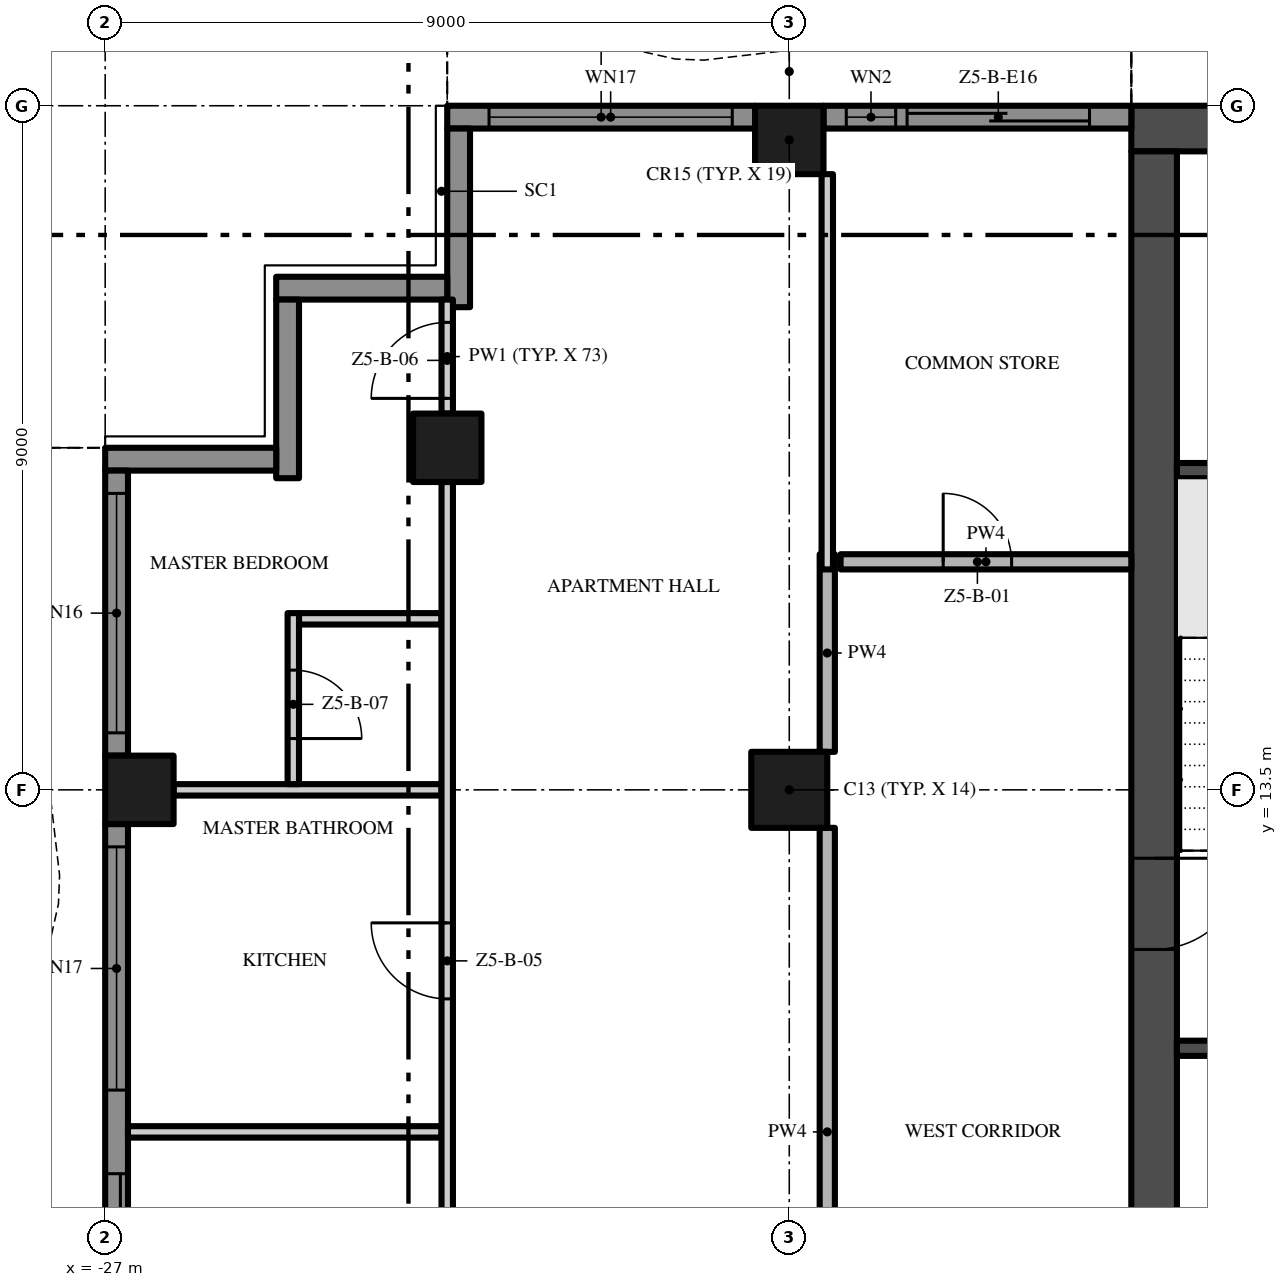
"""IFC4 building model, lengths in metres.
Left out: names, types, materials, properties, quantities, classifications, styles, units other than length and angle.
Written with IfcOpenShell. Run it as: python <this file> out.ifc"""

import sys

from ifc_helpers import new_model, si_unit, direction, frame, frame_2d, origin, origin_2d, place, context, subcontext, project, spatial, polyline, rectangle, outline, extrude, element, fill, save


model = new_model("IFC4")
c1 = context("Model", 3, precision=1e-05, world=origin(), true_north=direction((0.0, 1.0)))
c2 = subcontext(c1, "Body", "Model", "MODEL_VIEW")
j1 = project(units=[si_unit("LENGTHUNIT", "METRE"), si_unit("PLANEANGLEUNIT", "RADIAN")], contexts=[c1])
p1 = place(None, origin())
s1 = spatial("IfcSite", under=j1, at=p1, CompositionType="ELEMENT")
p2 = place(p1, origin())
s2 = spatial("IfcBuilding", under=s1, at=p2, CompositionType="ELEMENT")
p3 = place(p2, frame((0.0, 0.0, 254.0)))
s3 = spatial("IfcBuildingStorey", under=s2, at=p3, CompositionType="ELEMENT", Elevation=254.0)
p4 = place(p3, frame((13.5, 22.2, -0.3), z_axis=(0.0, 0.0, 1.0), x_axis=(-1.0, 0.0, 0.0)))
e1 = element("IfcWall", 1, at=p4, inside=s3, PredefinedType="SHEAR", context=c2, shape_type="SweptSolid", body=[
    extrude(rectangle(XDim=27.0, YDim=0.6, at=frame_2d((13.5, 0.0))), origin(), (0.0, 0.0, 1.0), 3.8),
])
p5 = place(p3, frame((-13.2, 21.9, -0.3), z_axis=(0.0, 0.0, 1.0), x_axis=(0.0, -1.0, 0.0)))
e2 = element("IfcWall", 2, at=p5, inside=s3, PredefinedType="SHEAR", context=c2, shape_type="SweptSolid", body=[
    extrude(rectangle(XDim=16.8, YDim=0.6, at=frame_2d((8.4, 0.0))), origin(), (0.0, 0.0, 1.0), 3.8),
])
p6 = place(p5, frame((9.3, 0.0, 0.3)))
e3 = element("IfcOpeningElement", 3, at=p6, cuts=e2, PredefinedType="OPENING", context=c2, shape_type="SweptSolid", body=[
    extrude(rectangle(XDim=1.2, YDim=2.2, at=frame_2d((0.6, 1.1))), frame((0.0, 0.31, 0.0), z_axis=(0.0, -1.0, 0.0), x_axis=(1.0, 0.0, 0.0)), (0.0, 0.0, 1.0), 0.62),
])
p7 = place(p3, frame((-18.0, 13.5, 0.0), z_axis=(0.0, 0.0, 1.0), x_axis=(1.0, 0.0, 0.0)))
e4 = element("IfcColumn", 4, at=p7, inside=s3, PredefinedType="COLUMN", context=c2, shape_type="SweptSolid", body=[
    extrude(rectangle(XDim=1.0, YDim=1.0, at=origin_2d()), origin(), (0.0, 0.0, 1.0), 3.5),
])
for number, where, z_axis, x_axis in (
    (5, (-18.0, 22.05, 0.0), (0.0, 0.0, 1.0), (1.0, 0.0, 0.0)),
    (6, (-26.55, 13.5, 0.0), (0.0, 0.0, 1.0), (1.0, 0.0, 0.0)),
    (7, (-22.5, 18.0, 0.0), (0.0, 0.0, 1.0), (1.0, 0.0, 0.0)),
):
    element("IfcColumn", number, at=place(p3, frame(where, z_axis=z_axis, x_axis=x_axis)), inside=s3, PredefinedType="COLUMN", context=c2, shape_type="SweptSolid", body=[
        extrude(rectangle(XDim=0.9, YDim=0.9, at=origin_2d()), origin(), (0.0, 0.0, 1.0), 3.5),
    ])
p8 = place(p3, frame((-17.55, 22.35, 0.0), z_axis=(0.0, 0.0, 1.0), x_axis=(1.0, 0.0, 0.0)))
e8 = element("IfcWall", 8, at=p8, inside=s3, PredefinedType="SOLIDWALL", context=c2, shape_type="SweptSolid", body=[
    extrude(rectangle(XDim=4.05, YDim=0.3, at=frame_2d((2.025, 0.0))), origin(), (0.0, 0.0, 1.0), 3.5),
])
p9 = place(p8, frame((1.1, 0.0, 0.0)))
e9 = element("IfcOpeningElement", 9, at=p9, cuts=e8, PredefinedType="OPENING", context=c2, shape_type="SweptSolid", body=[
    extrude(rectangle(XDim=2.4, YDim=2.4, at=frame_2d((1.2, 1.2))), frame((0.0, 0.16, 0.0), z_axis=(0.0, -1.0, 0.0), x_axis=(1.0, 0.0, 0.0)), (0.0, 0.0, 1.0), 0.32),
])
p10 = place(p8, frame((0.3, 0.0, 0.45)))
e10 = element("IfcOpeningElement", 10, at=p10, cuts=e8, PredefinedType="OPENING", context=c2, shape_type="SweptSolid", body=[
    extrude(rectangle(XDim=0.65, YDim=2.65, at=frame_2d((0.325, 1.325))), frame((0.0, 0.16, 0.0), z_axis=(0.0, -1.0, 0.0), x_axis=(1.0, 0.0, 0.0)), (0.0, 0.0, 1.0), 0.32),
])
p11 = place(p3, frame((-22.5, 22.35, 0.0), z_axis=(0.0, 0.0, 1.0), x_axis=(1.0, 0.0, 0.0)))
e11 = element("IfcWall", 11, at=p11, inside=s3, PredefinedType="SOLIDWALL", context=c2, shape_type="SweptSolid", body=[
    extrude(rectangle(XDim=4.05, YDim=0.3, at=frame_2d((2.025, 0.0))), origin(), (0.0, 0.0, 1.0), 3.5),
])
p12 = place(p11, frame((0.55, 0.0, 0.45)))
e12 = element("IfcOpeningElement", 12, at=p12, cuts=e11, PredefinedType="OPENING", context=c2, shape_type="SweptSolid", body=[
    extrude(rectangle(XDim=3.2, YDim=2.65, at=frame_2d((1.6, 1.325))), frame((0.0, 0.16, 0.0), z_axis=(0.0, -1.0, 0.0), x_axis=(1.0, 0.0, 0.0)), (0.0, 0.0, 1.0), 0.32),
])
p13 = place(p3, frame((-22.35, 19.85, 0.0), z_axis=(0.0, 0.0, 1.0), x_axis=(0.0, 1.0, 0.0)))
e13 = element("IfcWall", 13, at=p13, inside=s3, PredefinedType="SOLIDWALL", context=c2, shape_type="SweptSolid", body=[
    extrude(rectangle(XDim=2.35, YDim=0.3, at=frame_2d((1.175, 0.0))), origin(), (0.0, 0.0, 1.0), 3.5),
])
p14 = place(p3, frame((-24.75, 20.1, 0.0), z_axis=(0.0, 0.0, 1.0), x_axis=(1.0, 0.0, 0.0)))
e14 = element("IfcWall", 14, at=p14, inside=s3, PredefinedType="SOLIDWALL", context=c2, shape_type="SweptSolid", body=[
    extrude(rectangle(XDim=2.25, YDim=0.3, at=frame_2d((1.125, 0.0))), origin(), (0.0, 0.0, 1.0), 3.5),
])
p15 = place(p3, frame((-24.6, 17.6, 0.0), z_axis=(0.0, 0.0, 1.0), x_axis=(0.0, 1.0, 0.0)))
e15 = element("IfcWall", 15, at=p15, inside=s3, PredefinedType="SOLIDWALL", context=c2, shape_type="SweptSolid", body=[
    extrude(rectangle(XDim=2.35, YDim=0.3, at=frame_2d((1.175, 0.0))), origin(), (0.0, 0.0, 1.0), 3.5),
])
p16 = place(p3, frame((-27.0, 17.85, 0.0), z_axis=(0.0, 0.0, 1.0), x_axis=(1.0, 0.0, 0.0)))
e16 = element("IfcWall", 16, at=p16, inside=s3, PredefinedType="SOLIDWALL", context=c2, shape_type="SweptSolid", body=[
    extrude(rectangle(XDim=2.25, YDim=0.3, at=frame_2d((1.125, 0.0))), origin(), (0.0, 0.0, 1.0), 3.5),
])
p17 = place(p3, frame((-26.85, 13.95, 0.0), z_axis=(0.0, 0.0, 1.0), x_axis=(0.0, 1.0, 0.0)))
e17 = element("IfcWall", 17, at=p17, inside=s3, PredefinedType="SOLIDWALL", context=c2, shape_type="SweptSolid", body=[
    extrude(rectangle(XDim=3.75, YDim=0.3, at=frame_2d((1.875, 0.0))), origin(), (0.0, 0.0, 1.0), 3.5),
])
p18 = place(p17, frame((0.3, 0.0, 0.45)))
e18 = element("IfcOpeningElement", 18, at=p18, cuts=e17, PredefinedType="OPENING", context=c2, shape_type="SweptSolid", body=[
    extrude(rectangle(XDim=3.15, YDim=2.65, at=frame_2d((1.575, 1.325))), frame((0.0, 0.16, 0.0), z_axis=(0.0, -1.0, 0.0), x_axis=(1.0, 0.0, 0.0)), (0.0, 0.0, 1.0), 0.32),
])
p19 = place(p3, frame((-26.85, 4.95, 0.0), z_axis=(0.0, 0.0, 1.0), x_axis=(0.0, 1.0, 0.0)))
e19 = element("IfcWall", 19, at=p19, inside=s3, PredefinedType="SOLIDWALL", context=c2, shape_type="SweptSolid", body=[
    extrude(rectangle(XDim=8.1, YDim=0.3, at=frame_2d((4.05, 0.0))), origin(), (0.0, 0.0, 1.0), 3.5),
])
p20 = place(p19, frame((4.6, 0.0, 0.45)))
e20 = element("IfcOpeningElement", 20, at=p20, cuts=e19, PredefinedType="OPENING", context=c2, shape_type="SweptSolid", body=[
    extrude(rectangle(XDim=3.2, YDim=2.65, at=frame_2d((1.6, 1.325))), frame((0.0, 0.16, 0.0), z_axis=(0.0, -1.0, 0.0), x_axis=(1.0, 0.0, 0.0)), (0.0, 0.0, 1.0), 0.32),
])
p21 = place(p19, frame((0.3, 0.0, 0.0)))
e21 = element("IfcOpeningElement", 21, at=p21, cuts=e19, PredefinedType="OPENING", context=c2, shape_type="SweptSolid", body=[
    extrude(rectangle(XDim=3.2, YDim=2.4, at=frame_2d((1.6, 1.2))), frame((0.0, 0.16, 0.0), z_axis=(0.0, -1.0, 0.0), x_axis=(1.0, 0.0, 0.0)), (0.0, 0.0, 1.0), 0.32),
])
p22 = place(p3, origin())
e22 = element("IfcWall", 22, at=p22, inside=s3, PredefinedType="USERDEFINED", context=c2, shape_type="SweptSolid", body=[
    extrude(outline(polyline([(-13.5, 25.149), (-15.0, 24.488), (-16.5, 23.755), (-18.0, 23.231), (-19.125, 23.1), (-19.5, 23.115), (-21.0, 23.451), (-22.5, 24.112), (-22.601, 23.883), (-21.079, 23.213), (-19.533, 22.866), (-19.115, 22.849), (-17.944, 22.986), (-16.404, 23.524), (-14.895, 24.261), (-13.399, 24.92), (-13.5, 25.149)])), origin(), (0.0, 0.0, 1.0), 0.9),
])
p23 = place(p3, origin())
e23 = element("IfcWall", 23, at=p23, inside=s3, PredefinedType="USERDEFINED", context=c2, shape_type="SweptSolid", body=[
    extrude(outline(polyline([(-29.649, 18.0), (-28.988, 16.5), (-28.255, 15.0), (-27.731, 13.5), (-27.6, 12.375), (-27.615, 12.0), (-27.951, 10.5), (-28.612, 9.0), (-29.345, 7.5), (-29.869, 6.0), (-30.0, 4.875), (-29.985, 4.5), (-29.649, 3.0), (-28.988, 1.5), (-28.255, 0.0), (-27.731, -1.5), (-27.6, -2.625), (-27.615, -3.0), (-27.951, -4.5), (-28.612, -6.0), (-29.345, -7.5), (-29.869, -9.0), (-30.0, -10.125), (-29.985, -10.5), (-29.649, -12.0), (-28.988, -13.5), (-28.255, -15.0), (-27.731, -16.5), (-27.6, -17.625), (-27.615, -18.0), (-27.365, -18.01), (-27.349, -17.615), (-27.486, -16.444), (-28.024, -14.904), (-28.761, -13.395), (-29.41, -11.921), (-29.736, -10.467), (-29.749, -10.135), (-29.624, -9.056), (-29.114, -7.596), (-28.385, -6.105), (-27.713, -4.579), (-27.366, -3.033), (-27.349, -2.615), (-27.486, -1.444), (-28.024, 0.096), (-28.761, 1.605), (-29.41, 3.079), (-29.736, 4.533), (-29.749, 4.865), (-29.624, 5.944), (-29.114, 7.404), (-28.385, 8.895), (-27.713, 10.421), (-27.366, 11.967), (-27.349, 12.385), (-27.486, 13.556), (-28.024, 15.096), (-28.761, 16.605), (-29.42, 18.101), (-29.649, 18.0)])), origin(), (0.0, 0.0, 1.0), 0.9),
])
for number, where, z_axis, x_axis in (
    (24, (-12.9, 10.1, 0.0), (0.0, 0.0, 1.0), (1.0, 0.0, 0.0)),
    (25, (-12.9, 17.7, 0.0), (0.0, 0.0, 1.0), (1.0, 0.0, 0.0)),
):
    element("IfcWall", number, at=place(p3, frame(where, z_axis=z_axis, x_axis=x_axis)), inside=s3, PredefinedType="SHEAR", context=c2, shape_type="SweptSolid", body=[
        extrude(rectangle(XDim=3.25, YDim=0.2, at=frame_2d((1.625, 0.0))), origin(), (0.0, 0.0, 1.0), 3.5),
    ])
p24 = place(p3, frame((-26.7, 9.0, 0.0), z_axis=(0.0, 0.0, 1.0), x_axis=(1.0, 0.0, 0.0)))
e26 = element("IfcWall", 26, at=p24, inside=s3, PredefinedType="PARTITIONING", context=c2, shape_type="SweptSolid", body=[
    extrude(rectangle(XDim=4.125, YDim=0.15, at=frame_2d((2.062, 0.0))), origin(), (0.0, 0.0, 1.0), 3.5),
])
p25 = place(p3, frame((-26.1, 13.5, 0.0), z_axis=(0.0, 0.0, 1.0), x_axis=(1.0, 0.0, 0.0)))
e27 = element("IfcWall", 27, at=p25, inside=s3, PredefinedType="PARTITIONING", context=c2, shape_type="SweptSolid", body=[
    extrude(rectangle(XDim=3.525, YDim=0.15, at=frame_2d((1.762, 0.0))), origin(), (0.0, 0.0, 1.0), 3.5),
])
p26 = place(p3, frame((-24.45, 15.75, 0.0), z_axis=(0.0, 0.0, 1.0), x_axis=(1.0, 0.0, 0.0)))
e28 = element("IfcWall", 28, at=p26, inside=s3, PredefinedType="PARTITIONING", context=c2, shape_type="SweptSolid", body=[
    extrude(rectangle(XDim=1.875, YDim=0.15, at=frame_2d((0.938, 0.0))), origin(), (0.0, 0.0, 1.0), 3.5),
])
p27 = place(p3, frame((-17.325, 16.5, 0.0), z_axis=(0.0, 0.0, 1.0), x_axis=(1.0, 0.0, 0.0)))
e29 = element("IfcWall", 29, at=p27, inside=s3, PredefinedType="PARTITIONING", context=c2, shape_type="SweptSolid", body=[
    extrude(rectangle(XDim=3.825, YDim=0.2, at=frame_2d((1.913, 0.0))), origin(), (0.0, 0.0, 1.0), 3.5),
])
p28 = place(p27, frame((1.35, 0.0, 0.0)))
e30 = element("IfcOpeningElement", 30, at=p28, cuts=e29, PredefinedType="OPENING", context=c2, shape_type="SweptSolid", body=[
    extrude(rectangle(XDim=0.9, YDim=2.1, at=frame_2d((0.45, 1.05))), frame((0.0, 0.11, 0.0), z_axis=(0.0, -1.0, 0.0), x_axis=(1.0, 0.0, 0.0)), (0.0, 0.0, 1.0), 0.22),
])
p29 = place(p3, frame((-24.525, 15.825, 0.0), z_axis=(0.0, 0.0, 1.0), x_axis=(0.0, -1.0, 0.0)))
e31 = element("IfcWall", 31, at=p29, inside=s3, PredefinedType="PARTITIONING", context=c2, shape_type="SweptSolid", body=[
    extrude(rectangle(XDim=2.25, YDim=0.15, at=frame_2d((1.125, 0.0))), origin(), (0.0, 0.0, 1.0), 3.5),
])
p30 = place(p29, frame((0.75, 0.0, 0.0)))
e32 = element("IfcOpeningElement", 32, at=p30, cuts=e31, PredefinedType="OPENING", context=c2, shape_type="SweptSolid", body=[
    extrude(rectangle(XDim=0.9, YDim=2.1, at=frame_2d((0.45, 1.05))), frame((0.0, 0.085, 0.0), z_axis=(0.0, -1.0, 0.0), x_axis=(1.0, 0.0, 0.0)), (0.0, 0.0, 1.0), 0.17),
])
p31 = place(p3, frame((-22.5, 0.1, 0.0), z_axis=(0.0, 0.0, 1.0), x_axis=(0.0, 1.0, 0.0)))
e33 = element("IfcWall", 33, at=p31, inside=s3, PredefinedType="PARTITIONING", context=c2, shape_type="SweptSolid", body=[
    extrude(rectangle(XDim=17.45, YDim=0.15, at=frame_2d((8.725, 0.0))), origin(), (0.0, 0.0, 1.0), 3.5),
])
p32 = place(p31, frame((2.4, 0.0, 0.0)))
e34 = element("IfcOpeningElement", 34, at=p32, cuts=e33, PredefinedType="OPENING", context=c2, shape_type="SweptSolid", body=[
    extrude(rectangle(XDim=1.8, YDim=2.4, at=frame_2d((0.9, 1.2))), frame((0.0, 0.085, 0.0), z_axis=(0.0, -1.0, 0.0), x_axis=(1.0, 0.0, 0.0)), (0.0, 0.0, 1.0), 0.17),
])
p33 = place(p31, frame((10.65, 0.0, 0.0)))
e35 = element("IfcOpeningElement", 35, at=p33, cuts=e33, PredefinedType="OPENING", context=c2, shape_type="SweptSolid", body=[
    extrude(rectangle(XDim=1.0, YDim=2.4, at=frame_2d((0.5, 1.2))), frame((0.0, 0.085, 0.0), z_axis=(0.0, -1.0, 0.0), x_axis=(1.0, 0.0, 0.0)), (0.0, 0.0, 1.0), 0.17),
])
p34 = place(p3, frame((-22.5, 18.45, 0.0), z_axis=(0.0, 0.0, 1.0), x_axis=(0.0, 1.0, 0.0)))
e36 = element("IfcWall", 36, at=p34, inside=s3, PredefinedType="PARTITIONING", context=c2, shape_type="SweptSolid", body=[
    extrude(rectangle(XDim=1.5, YDim=0.15, at=frame_2d((0.75, 0.0))), origin(), (0.0, 0.0, 1.0), 3.5),
])
p35 = place(p34, frame((0.2, 0.0, 0.0)))
e37 = element("IfcOpeningElement", 37, at=p35, cuts=e36, PredefinedType="OPENING", context=c2, shape_type="SweptSolid", body=[
    extrude(rectangle(XDim=1.0, YDim=2.4, at=frame_2d((0.5, 1.2))), frame((0.0, 0.085, 0.0), z_axis=(0.0, -1.0, 0.0), x_axis=(1.0, 0.0, 0.0)), (0.0, 0.0, 1.0), 0.17),
])
p36 = place(p3, frame((-17.5, 5.0, 0.0), z_axis=(0.0, 0.0, 1.0), x_axis=(0.0, 1.0, 0.0)))
e38 = element("IfcWall", 38, at=p36, inside=s3, PredefinedType="PARTITIONING", context=c2, shape_type="SweptSolid", body=[
    extrude(rectangle(XDim=8.0, YDim=0.2, at=frame_2d((4.0, 0.0))), origin(), (0.0, 0.0, 1.0), 3.5),
])
p37 = place(p36, frame((1.15, 0.0, 0.0)))
e39 = element("IfcOpeningElement", 39, at=p37, cuts=e38, PredefinedType="OPENING", context=c2, shape_type="SweptSolid", body=[
    extrude(rectangle(XDim=1.2, YDim=2.4, at=frame_2d((0.6, 1.2))), frame((0.0, 0.11, 0.0), z_axis=(0.0, -1.0, 0.0), x_axis=(1.0, 0.0, 0.0)), (0.0, 0.0, 1.0), 0.22),
])
p38 = place(p3, frame((-17.5, 14.0, 0.0), z_axis=(0.0, 0.0, 1.0), x_axis=(0.0, 1.0, 0.0)))
e40 = element("IfcWall", 40, at=p38, inside=s3, PredefinedType="PARTITIONING", context=c2, shape_type="SweptSolid", body=[
    extrude(rectangle(XDim=2.6, YDim=0.2, at=frame_2d((1.3, 0.0))), origin(), (0.0, 0.0, 1.0), 3.5),
])
p39 = place(p3, frame((-17.5, 16.4, 0.0), z_axis=(0.0, 0.0, 1.0), x_axis=(0.0, 1.0, 0.0)))
e41 = element("IfcWall", 41, at=p39, inside=s3, PredefinedType="PARTITIONING", context=c2, shape_type="SweptSolid", body=[
    extrude(rectangle(XDim=5.2, YDim=0.15, at=frame_2d((2.6, 0.0))), origin(), (0.0, 0.0, 1.0), 3.5),
])
p40 = place(p9, origin())
e42 = element("IfcDoor", 42, at=p40, inside=s3, OperationType="SINGLE_SWING_LEFT", PredefinedType="DOOR", context=c2, shape_type="SweptSolid", body=[
    extrude(rectangle(XDim=2.4, YDim=2.4, at=frame_2d((1.2, 1.2))), frame((0.0, 0.025, 0.0), z_axis=(0.0, -1.0, 0.0), x_axis=(1.0, 0.0, 0.0)), (0.0, 0.0, 1.0), 0.05),
])
fill(e9, e42)
p41 = place(p10, origin())
e43 = element("IfcWindow", 43, at=p41, inside=s3, PartitioningType="SINGLE_PANEL", PredefinedType="WINDOW", context=c2, shape_type="SweptSolid", body=[
    extrude(rectangle(XDim=0.65, YDim=2.65, at=frame_2d((0.325, 1.325))), frame((0.0, 0.03, 0.0), z_axis=(0.0, -1.0, 0.0), x_axis=(1.0, 0.0, 0.0)), (0.0, 0.0, 1.0), 0.06),
])
fill(e10, e43)
p42 = place(p12, origin())
e44 = element("IfcWindow", 44, at=p42, inside=s3, PartitioningType="SINGLE_PANEL", PredefinedType="WINDOW", context=c2, shape_type="SweptSolid", body=[
    extrude(rectangle(XDim=3.2, YDim=2.65, at=frame_2d((1.6, 1.325))), frame((0.0, 0.03, 0.0), z_axis=(0.0, -1.0, 0.0), x_axis=(1.0, 0.0, 0.0)), (0.0, 0.0, 1.0), 0.06),
])
fill(e12, e44)
p43 = place(p18, origin())
e45 = element("IfcWindow", 45, at=p43, inside=s3, PartitioningType="SINGLE_PANEL", PredefinedType="WINDOW", context=c2, shape_type="SweptSolid", body=[
    extrude(rectangle(XDim=3.15, YDim=2.65, at=frame_2d((1.575, 1.325))), frame((0.0, 0.03, 0.0), z_axis=(0.0, -1.0, 0.0), x_axis=(1.0, 0.0, 0.0)), (0.0, 0.0, 1.0), 0.06),
])
fill(e18, e45)
p44 = place(p20, origin())
e46 = element("IfcWindow", 46, at=p44, inside=s3, PartitioningType="SINGLE_PANEL", PredefinedType="WINDOW", context=c2, shape_type="SweptSolid", body=[
    extrude(rectangle(XDim=3.2, YDim=2.65, at=frame_2d((1.6, 1.325))), frame((0.0, 0.03, 0.0), z_axis=(0.0, -1.0, 0.0), x_axis=(1.0, 0.0, 0.0)), (0.0, 0.0, 1.0), 0.06),
])
fill(e20, e46)
p45 = place(p21, origin())
e47 = element("IfcDoor", 47, at=p45, inside=s3, OperationType="SINGLE_SWING_LEFT", PredefinedType="DOOR", context=c2, shape_type="SweptSolid", body=[
    extrude(rectangle(XDim=3.2, YDim=2.4, at=frame_2d((1.6, 1.2))), frame((0.0, 0.025, 0.0), z_axis=(0.0, -1.0, 0.0), x_axis=(1.0, 0.0, 0.0)), (0.0, 0.0, 1.0), 0.05),
])
fill(e21, e47)
p46 = place(p6, frame((1.2, 0.0, 0.0), z_axis=(0.0, 0.0, 1.0), x_axis=(-1.0, 0.0, 0.0)))
e48 = element("IfcDoor", 48, at=p46, inside=s3, OperationType="SINGLE_SWING_RIGHT", PredefinedType="DOOR", context=c2, shape_type="SweptSolid", body=[
    extrude(rectangle(XDim=1.2, YDim=2.2, at=frame_2d((0.6, 1.1))), frame((0.0, 0.025, 0.0), z_axis=(0.0, -1.0, 0.0), x_axis=(1.0, 0.0, 0.0)), (0.0, 0.0, 1.0), 0.05),
])
fill(e3, e48)
p47 = place(p28, origin())
e49 = element("IfcDoor", 49, at=p47, inside=s3, OperationType="SINGLE_SWING_LEFT", PredefinedType="DOOR", context=c2, shape_type="SweptSolid", body=[
    extrude(rectangle(XDim=0.9, YDim=2.1, at=frame_2d((0.45, 1.05))), frame((0.0, 0.025, 0.0), z_axis=(0.0, -1.0, 0.0), x_axis=(1.0, 0.0, 0.0)), (0.0, 0.0, 1.0), 0.05),
])
fill(e30, e49)
p48 = place(p33, origin())
e50 = element("IfcDoor", 50, at=p48, inside=s3, OperationType="SINGLE_SWING_RIGHT", PredefinedType="DOOR", context=c2, shape_type="SweptSolid", body=[
    extrude(rectangle(XDim=1.0, YDim=2.4, at=frame_2d((0.5, 1.2))), frame((0.0, 0.025, 0.0), z_axis=(0.0, -1.0, 0.0), x_axis=(1.0, 0.0, 0.0)), (0.0, 0.0, 1.0), 0.05),
])
fill(e35, e50)
p49 = place(p35, origin())
e51 = element("IfcDoor", 51, at=p49, inside=s3, OperationType="SINGLE_SWING_LEFT", PredefinedType="DOOR", context=c2, shape_type="SweptSolid", body=[
    extrude(rectangle(XDim=1.0, YDim=2.4, at=frame_2d((0.5, 1.2))), frame((0.0, 0.025, 0.0), z_axis=(0.0, -1.0, 0.0), x_axis=(1.0, 0.0, 0.0)), (0.0, 0.0, 1.0), 0.05),
])
fill(e37, e51)
p50 = place(p30, origin())
e52 = element("IfcDoor", 52, at=p50, inside=s3, OperationType="SINGLE_SWING_RIGHT", PredefinedType="DOOR", context=c2, shape_type="SweptSolid", body=[
    extrude(rectangle(XDim=0.9, YDim=2.1, at=frame_2d((0.45, 1.05))), frame((0.0, 0.025, 0.0), z_axis=(0.0, -1.0, 0.0), x_axis=(1.0, 0.0, 0.0)), (0.0, 0.0, 1.0), 0.05),
])
fill(e32, e52)
save(model, sys.argv[1])
